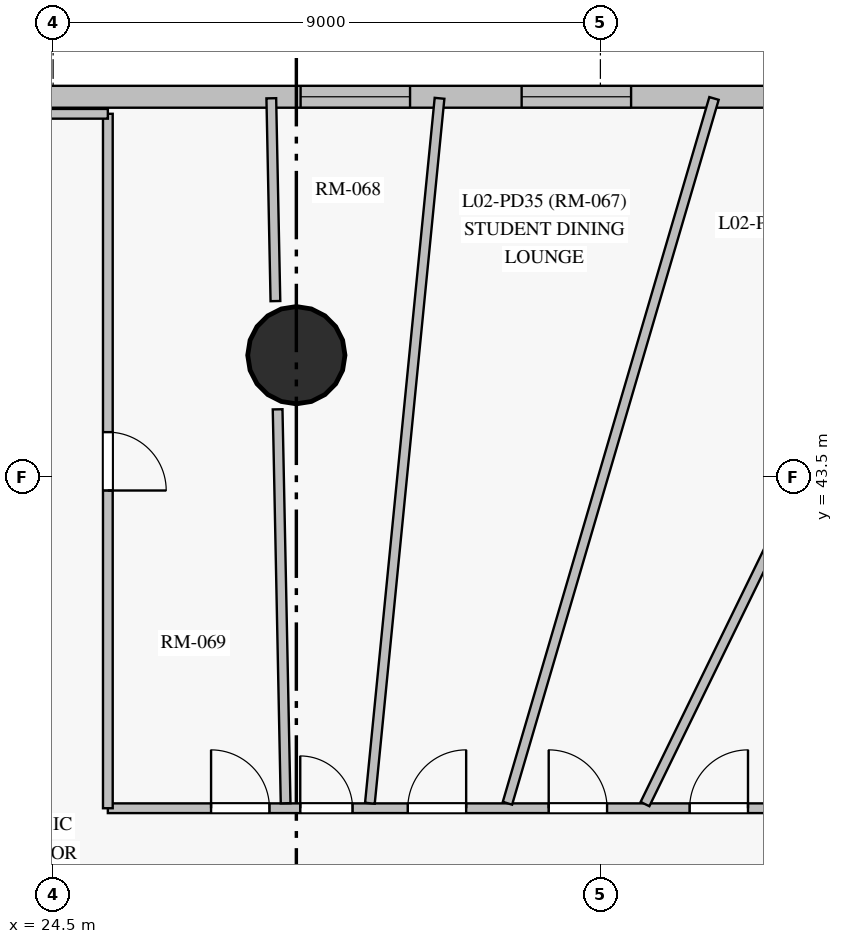
"""IFC4 building model, lengths in metres.
Left out: names, types, materials, properties, quantities, classifications, styles, units other than length and angle.
Written with IfcOpenShell. Run it as: python <this file> out.ifc"""

import sys

from ifc_helpers import new_model, si_unit, direction, frame, frame_2d, origin, origin_with_axes, origin_2d, place, context, subcontext, project, spatial, rectangle, circle, extrude, source, transform, mapped, element, fill, save


model = new_model("IFC4")
c1 = context("Model", 3, precision=1e-05, world=origin(), true_north=direction((0.0, 1.0)))
c2 = subcontext(c1, "Body", "Model", "MODEL_VIEW")
j1 = project(units=[si_unit("LENGTHUNIT", "METRE"), si_unit("PLANEANGLEUNIT", "RADIAN")], contexts=[c1])
p1 = place(None, origin())
s1 = spatial("IfcSite", under=j1, at=p1, CompositionType="ELEMENT")
p2 = place(p1, origin())
s2 = spatial("IfcBuilding", under=s1, at=p2, CompositionType="ELEMENT")
p3 = place(p2, frame((0.0, 0.0, 9.0)))
s3 = spatial("IfcBuildingStorey", under=s2, at=p3, CompositionType="ELEMENT", Elevation=9.0)
m1 = source(origin_with_axes(), c2, "Body", "SweptSolid", [
    extrude(circle(Radius=0.8, at=origin_2d()), origin(), (0.0, 0.0, 1.0), 4.5),
])
p4 = place(p3, frame((28.5, 45.5, 0.0), z_axis=(0.0, 0.0, 1.0), x_axis=(1.0, 0.0, 0.0)))
e1 = element("IfcColumn", 1, at=p4, inside=s3, PredefinedType="COLUMN", context=c2, shape_type="MappedRepresentation", body=[
    mapped(m1, transform((0.0, 0.0, 0.0), scale=1.0)),
])
p5 = place(p3, frame((54.6, 49.75, 0.0), z_axis=(0.0, 0.0, 1.0), x_axis=(-1.0, 0.0, 0.0)))
e2 = element("IfcWall", 2, at=p5, inside=s3, PredefinedType="SOLIDWALL", context=c2, shape_type="SweptSolid", body=[
    extrude(rectangle(XDim=49.25, YDim=0.36, at=frame_2d((24.625, 0.0))), origin(), (0.0, 0.0, 1.0), 4.2),
])
p6 = place(p5, frame((1.866, 0.0, 0.85)))
e3 = element("IfcOpeningElement", 3, at=p6, cuts=e2, PredefinedType="OPENING", context=c2, shape_type="SweptSolid", body=[
    extrude(rectangle(XDim=1.8, YDim=2.2, at=frame_2d((0.9, 1.1))), frame((0.0, 0.19, 0.0), z_axis=(0.0, -1.0, 0.0), x_axis=(1.0, 0.0, 0.0)), (0.0, 0.0, 1.0), 0.38),
])
p7 = place(p5, frame((6.763, 0.0, 0.85)))
e4 = element("IfcOpeningElement", 4, at=p7, cuts=e2, PredefinedType="OPENING", context=c2, shape_type="SweptSolid", body=[
    extrude(rectangle(XDim=1.8, YDim=2.2, at=frame_2d((0.9, 1.1))), frame((0.0, 0.19, 0.0), z_axis=(0.0, -1.0, 0.0), x_axis=(1.0, 0.0, 0.0)), (0.0, 0.0, 1.0), 0.38),
])
p8 = place(p5, frame((11.474, 0.0, 0.85)))
e5 = element("IfcOpeningElement", 5, at=p8, cuts=e2, PredefinedType="OPENING", context=c2, shape_type="SweptSolid", body=[
    extrude(rectangle(XDim=1.8, YDim=2.2, at=frame_2d((0.9, 1.1))), frame((0.0, 0.19, 0.0), z_axis=(0.0, -1.0, 0.0), x_axis=(1.0, 0.0, 0.0)), (0.0, 0.0, 1.0), 0.38),
])
p9 = place(p5, frame((16.083, 0.0, 0.85)))
e6 = element("IfcOpeningElement", 6, at=p9, cuts=e2, PredefinedType="OPENING", context=c2, shape_type="SweptSolid", body=[
    extrude(rectangle(XDim=1.8, YDim=2.2, at=frame_2d((0.9, 1.1))), frame((0.0, 0.19, 0.0), z_axis=(0.0, -1.0, 0.0), x_axis=(1.0, 0.0, 0.0)), (0.0, 0.0, 1.0), 0.38),
])
p10 = place(p5, frame((20.595, 0.0, 0.85)))
e7 = element("IfcOpeningElement", 7, at=p10, cuts=e2, PredefinedType="OPENING", context=c2, shape_type="SweptSolid", body=[
    extrude(rectangle(XDim=1.8, YDim=2.2, at=frame_2d((0.9, 1.1))), frame((0.0, 0.19, 0.0), z_axis=(0.0, -1.0, 0.0), x_axis=(1.0, 0.0, 0.0)), (0.0, 0.0, 1.0), 0.38),
])
p11 = place(p5, frame((24.23, 0.0, 0.85)))
e8 = element("IfcOpeningElement", 8, at=p11, cuts=e2, PredefinedType="OPENING", context=c2, shape_type="SweptSolid", body=[
    extrude(rectangle(XDim=1.8, YDim=2.2, at=frame_2d((0.9, 1.1))), frame((0.0, 0.19, 0.0), z_axis=(0.0, -1.0, 0.0), x_axis=(1.0, 0.0, 0.0)), (0.0, 0.0, 1.0), 0.38),
])
p12 = place(p5, frame((30.4, 0.0, 0.85)))
e9 = element("IfcOpeningElement", 9, at=p12, cuts=e2, PredefinedType="OPENING", context=c2, shape_type="SweptSolid", body=[
    extrude(rectangle(XDim=1.8, YDim=2.2, at=frame_2d((0.9, 1.1))), frame((0.0, 0.19, 0.0), z_axis=(0.0, -1.0, 0.0), x_axis=(1.0, 0.0, 0.0)), (0.0, 0.0, 1.0), 0.38),
])
p13 = place(p5, frame((35.42, 0.0, 0.85)))
e10 = element("IfcOpeningElement", 10, at=p13, cuts=e2, PredefinedType="OPENING", context=c2, shape_type="SweptSolid", body=[
    extrude(rectangle(XDim=1.8, YDim=2.2, at=frame_2d((0.9, 1.1))), frame((0.0, 0.19, 0.0), z_axis=(0.0, -1.0, 0.0), x_axis=(1.0, 0.0, 0.0)), (0.0, 0.0, 1.0), 0.38),
])
p14 = place(p5, frame((40.69, 0.0, 0.85)))
e11 = element("IfcOpeningElement", 11, at=p14, cuts=e2, PredefinedType="OPENING", context=c2, shape_type="SweptSolid", body=[
    extrude(rectangle(XDim=1.8, YDim=2.2, at=frame_2d((0.9, 1.1))), frame((0.0, 0.19, 0.0), z_axis=(0.0, -1.0, 0.0), x_axis=(1.0, 0.0, 0.0)), (0.0, 0.0, 1.0), 0.38),
])
p15 = place(p5, frame((45.58, 0.0, 0.85)))
e12 = element("IfcOpeningElement", 12, at=p15, cuts=e2, PredefinedType="OPENING", context=c2, shape_type="SweptSolid", body=[
    extrude(rectangle(XDim=1.8, YDim=2.2, at=frame_2d((0.9, 1.1))), frame((0.0, 0.19, 0.0), z_axis=(0.0, -1.0, 0.0), x_axis=(1.0, 0.0, 0.0)), (0.0, 0.0, 1.0), 0.38),
])
p16 = place(p3, frame((25.4, 38.05, 0.0), z_axis=(0.0, 0.0, 1.0), x_axis=(1.0, 0.0, 0.0)))
e13 = element("IfcWall", 13, at=p16, inside=s3, PredefinedType="PARTITIONING", context=c2, shape_type="SweptSolid", body=[
    extrude(rectangle(XDim=15.45, YDim=0.16, at=frame_2d((7.725, 0.0))), origin(), (0.0, 0.0, 1.0), 4.2),
])
p17 = place(p16, frame((11.802, 0.0, 0.0)))
e14 = element("IfcOpeningElement", 14, at=p17, cuts=e13, PredefinedType="OPENING", context=c2, shape_type="SweptSolid", body=[
    extrude(rectangle(XDim=0.96, YDim=2.15, at=frame_2d((0.48, 1.075))), frame((0.0, 0.09, 0.0), z_axis=(0.0, -1.0, 0.0), x_axis=(1.0, 0.0, 0.0)), (0.0, 0.0, 1.0), 0.18),
])
p18 = place(p16, frame((9.567, 0.0, 0.0)))
e15 = element("IfcOpeningElement", 15, at=p18, cuts=e13, PredefinedType="OPENING", context=c2, shape_type="SweptSolid", body=[
    extrude(rectangle(XDim=0.96, YDim=2.15, at=frame_2d((0.48, 1.075))), frame((0.0, 0.09, 0.0), z_axis=(0.0, -1.0, 0.0), x_axis=(1.0, 0.0, 0.0)), (0.0, 0.0, 1.0), 0.18),
])
p19 = place(p16, frame((7.25, 0.0, 0.0)))
e16 = element("IfcOpeningElement", 16, at=p19, cuts=e13, PredefinedType="OPENING", context=c2, shape_type="SweptSolid", body=[
    extrude(rectangle(XDim=0.96, YDim=2.15, at=frame_2d((0.48, 1.075))), frame((0.0, 0.09, 0.0), z_axis=(0.0, -1.0, 0.0), x_axis=(1.0, 0.0, 0.0)), (0.0, 0.0, 1.0), 0.18),
])
p20 = place(p16, frame((4.933, 0.0, 0.0)))
e17 = element("IfcOpeningElement", 17, at=p20, cuts=e13, PredefinedType="OPENING", context=c2, shape_type="SweptSolid", body=[
    extrude(rectangle(XDim=0.96, YDim=2.15, at=frame_2d((0.48, 1.075))), frame((0.0, 0.09, 0.0), z_axis=(0.0, -1.0, 0.0), x_axis=(1.0, 0.0, 0.0)), (0.0, 0.0, 1.0), 0.18),
])
p21 = place(p16, frame((1.698, 0.0, 0.0)))
e18 = element("IfcOpeningElement", 18, at=p21, cuts=e13, PredefinedType="OPENING", context=c2, shape_type="SweptSolid", body=[
    extrude(rectangle(XDim=0.96, YDim=2.15, at=frame_2d((0.48, 1.075))), frame((0.0, 0.09, 0.0), z_axis=(0.0, -1.0, 0.0), x_axis=(1.0, 0.0, 0.0)), (0.0, 0.0, 1.0), 0.18),
])
p22 = place(p16, frame((3.164, 0.0, 0.0)))
e19 = element("IfcOpeningElement", 19, at=p22, cuts=e13, PredefinedType="OPENING", context=c2, shape_type="SweptSolid", body=[
    extrude(rectangle(XDim=0.86, YDim=2.04, at=frame_2d((0.43, 1.02))), frame((0.0, 0.09, 0.0), z_axis=(0.0, -1.0, 0.0), x_axis=(1.0, 0.0, 0.0)), (0.0, 0.0, 1.0), 0.18),
])
p23 = place(p3, frame((34.233, 38.118, 0.0), z_axis=(0.0, 0.0, 1.0), x_axis=(0.438369218091, 0.898794986985, 0.0)))
e20 = element("IfcWall", 20, at=p23, inside=s3, PredefinedType="PARTITIONING", context=c2, shape_type="SweptSolid", body=[
    extrude(rectangle(XDim=12.906, YDim=0.16, at=frame_2d((6.453, 0.0))), origin(), (0.0, 0.0, 1.0), 4.2),
])
p24 = place(p3, frame((31.972, 38.132, 0.0), z_axis=(0.0, 0.0, 1.0), x_axis=(0.281237056868, 0.959638326582, 0.0)))
e21 = element("IfcWall", 21, at=p24, inside=s3, PredefinedType="PARTITIONING", context=c2, shape_type="SweptSolid", body=[
    extrude(rectangle(XDim=12.078, YDim=0.16, at=frame_2d((6.039, 0.0))), origin(), (0.0, 0.0, 1.0), 4.2),
])
p25 = place(p3, frame((29.709, 38.132, 0.0), z_axis=(0.0, 0.0, 1.0), x_axis=(0.098293881021, 0.995157431241, 0.0)))
e22 = element("IfcWall", 22, at=p25, inside=s3, PredefinedType="PARTITIONING", context=c2, shape_type="SweptSolid", body=[
    extrude(rectangle(XDim=11.649, YDim=0.16, at=frame_2d((5.824, 0.0))), origin(), (0.0, 0.0, 1.0), 4.2),
])
p26 = place(p3, frame((25.4, 49.47, 0.0), z_axis=(0.0, 0.0, 1.0), x_axis=(0.0, -1.0, 0.0)))
e23 = element("IfcWall", 23, at=p26, inside=s3, PredefinedType="PARTITIONING", context=c2, shape_type="SweptSolid", body=[
    extrude(rectangle(XDim=11.42, YDim=0.16, at=frame_2d((5.71, 0.0))), origin(), (0.0, 0.0, 1.0), 4.2),
])
p27 = place(p26, frame((5.235, 0.0, 0.0)))
e24 = element("IfcOpeningElement", 24, at=p27, cuts=e23, PredefinedType="OPENING", context=c2, shape_type="SweptSolid", body=[
    extrude(rectangle(XDim=0.96, YDim=2.15, at=frame_2d((0.48, 1.075))), frame((0.0, 0.09, 0.0), z_axis=(0.0, -1.0, 0.0), x_axis=(1.0, 0.0, 0.0)), (0.0, 0.0, 1.0), 0.18),
])
p28 = place(p3, frame((28.323, 38.132, 0.0), z_axis=(0.0, 0.0, 1.0), x_axis=(-0.020309370156, 0.999793743471, 0.0)))
e25 = element("IfcWall", 25, at=p28, inside=s3, PredefinedType="PARTITIONING", context=c2, shape_type="SweptSolid", body=[
    extrude(rectangle(XDim=6.479, YDim=0.16, at=frame_2d((3.24, 0.0))), origin(), (0.0, 0.0, 1.0), 3.25),
])
p29 = place(p3, frame((21.2, 49.47, 0.0), z_axis=(0.0, 0.0, 1.0), x_axis=(1.0, 0.0, 0.0)))
e26 = element("IfcWall", 26, at=p29, inside=s3, PredefinedType="PARTITIONING", context=c2, shape_type="SweptSolid", body=[
    extrude(rectangle(XDim=4.2, YDim=0.16, at=frame_2d((2.1, 0.0))), origin(), (0.0, 0.0, 1.0), 4.2),
])
p30 = place(p3, frame((28.156, 46.39, 0.0), z_axis=(0.0, 0.0, 1.0), x_axis=(-0.020345688852, 0.999793005049, 0.0)))
e27 = element("IfcWall", 27, at=p30, inside=s3, PredefinedType="PARTITIONING", context=c2, shape_type="SweptSolid", body=[
    extrude(rectangle(XDim=3.336, YDim=0.16, at=frame_2d((1.668, 0.0))), origin(), (0.0, 0.0, 1.0), 4.2),
])
m2 = source(origin_with_axes(), c2, "Body", "SweptSolid", [
    extrude(rectangle(XDim=1.8, YDim=2.2, at=frame_2d((0.9, 1.1))), frame((0.0, 0.03, 0.0), z_axis=(0.0, -1.0, 0.0), x_axis=(1.0, 0.0, 0.0)), (0.0, 0.0, 1.0), 0.06),
])
p31 = place(p10, origin())
e28 = element("IfcWindow", 28, at=p31, inside=s3, PartitioningType="SINGLE_PANEL", PredefinedType="WINDOW", context=c2, shape_type="MappedRepresentation", body=[
    mapped(m2, transform((0.0, 0.0, 0.0), scale=1.0)),
])
fill(e7, e28)
p32 = place(p11, origin())
e29 = element("IfcWindow", 29, at=p32, inside=s3, PartitioningType="SINGLE_PANEL", PredefinedType="WINDOW", context=c2, shape_type="MappedRepresentation", body=[
    mapped(m2, transform((0.0, 0.0, 0.0), scale=1.0)),
])
fill(e8, e29)
m3 = source(origin_with_axes(), c2, "Body", "SweptSolid", [
    extrude(rectangle(XDim=0.96, YDim=2.15, at=frame_2d((0.48, 1.075))), frame((0.0, 0.025, 0.0), z_axis=(0.0, -1.0, 0.0), x_axis=(1.0, 0.0, 0.0)), (0.0, 0.0, 1.0), 0.05),
])
p33 = place(p18, origin())
e30 = element("IfcDoor", 30, at=p33, inside=s3, OperationType="SINGLE_SWING_RIGHT", PredefinedType="DOOR", context=c2, shape_type="MappedRepresentation", body=[
    mapped(m3, transform((0.0, 0.0, 0.0), scale=1.0)),
])
fill(e15, e30)
p34 = place(p19, origin())
e31 = element("IfcDoor", 31, at=p34, inside=s3, OperationType="SINGLE_SWING_LEFT", PredefinedType="DOOR", context=c2, shape_type="MappedRepresentation", body=[
    mapped(m3, transform((0.0, 0.0, 0.0), scale=1.0)),
])
fill(e16, e31)
p35 = place(p20, origin())
e32 = element("IfcDoor", 32, at=p35, inside=s3, OperationType="SINGLE_SWING_RIGHT", PredefinedType="DOOR", context=c2, shape_type="MappedRepresentation", body=[
    mapped(m3, transform((0.0, 0.0, 0.0), scale=1.0)),
])
fill(e17, e32)
p36 = place(p21, origin())
e33 = element("IfcDoor", 33, at=p36, inside=s3, OperationType="SINGLE_SWING_LEFT", PredefinedType="DOOR", context=c2, shape_type="MappedRepresentation", body=[
    mapped(m3, transform((0.0, 0.0, 0.0), scale=1.0)),
])
fill(e18, e33)
p37 = place(p27, origin())
e34 = element("IfcDoor", 34, at=p37, inside=s3, OperationType="SINGLE_SWING_RIGHT", PredefinedType="DOOR", context=c2, shape_type="MappedRepresentation", body=[
    mapped(m3, transform((0.0, 0.0, 0.0), scale=1.0)),
])
fill(e24, e34)
m4 = source(origin_with_axes(), c2, "Body", "SweptSolid", [
    extrude(rectangle(XDim=0.86, YDim=2.04, at=frame_2d((0.43, 1.02))), frame((0.0, 0.025, 0.0), z_axis=(0.0, -1.0, 0.0), x_axis=(1.0, 0.0, 0.0)), (0.0, 0.0, 1.0), 0.05),
])
p38 = place(p22, origin())
e35 = element("IfcDoor", 35, at=p38, inside=s3, OperationType="SINGLE_SWING_LEFT", PredefinedType="DOOR", context=c2, shape_type="MappedRepresentation", body=[
    mapped(m4, transform((0.0, 0.0, 0.0), scale=1.0)),
])
fill(e19, e35)
save(model, sys.argv[1])
